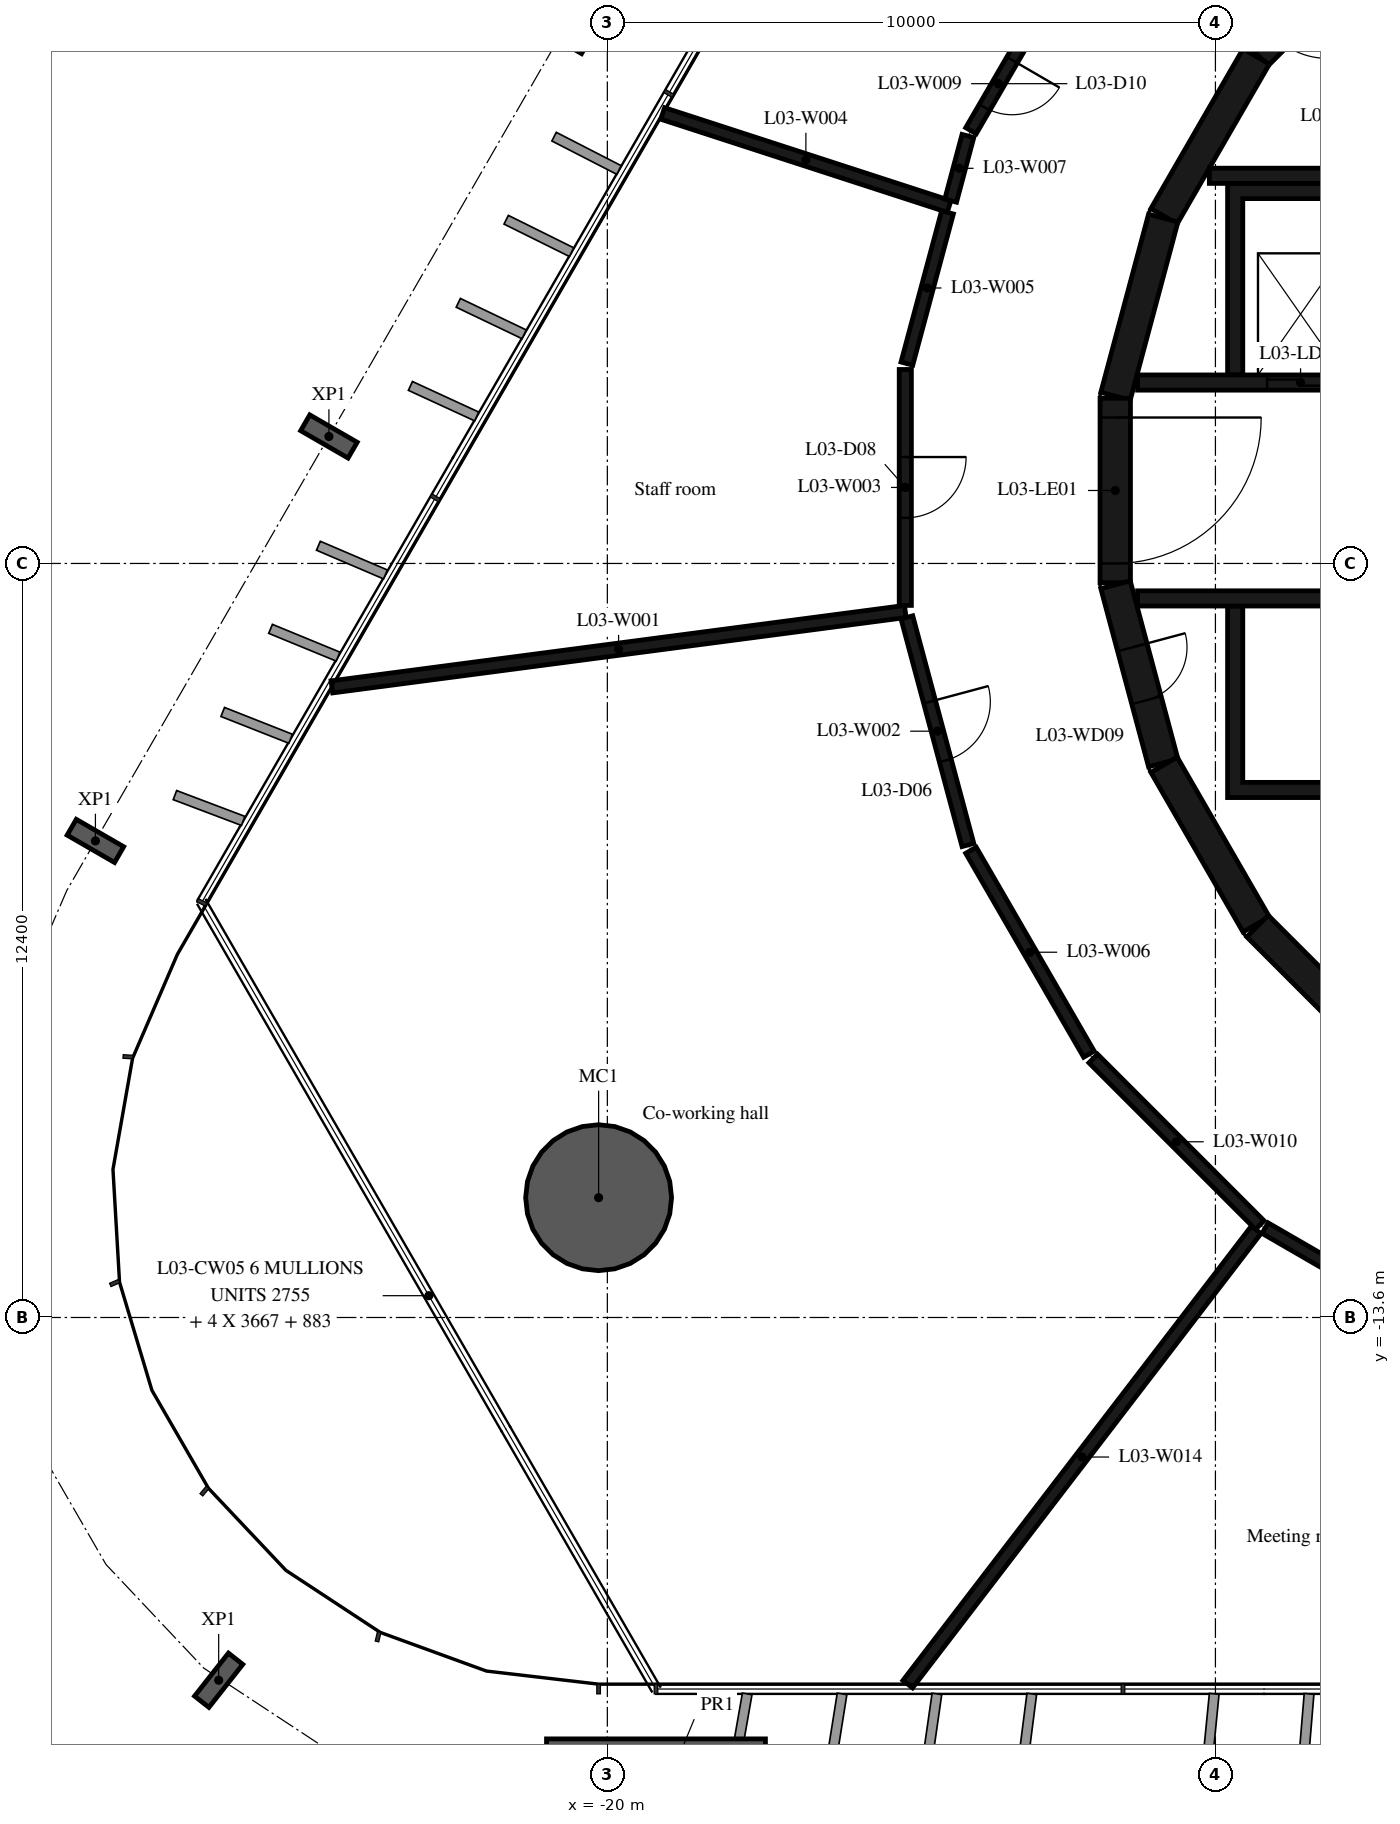
"""IFC4 building model, lengths in metres.
Left out: names, types, materials, properties, quantities, classifications, styles, units other than length and angle.
Written with IfcOpenShell. Run it as: python <this file> out.ifc"""

import sys

from ifc_helpers import new_model, si_unit, direction, frame, frame_2d, origin, origin_2d, place, context, subcontext, project, spatial, polyline, rectangle, hollow_circle, i_section, outline, extrude, element, fill, save


model = new_model("IFC4")
c1 = context("Model", 3, precision=1e-05, world=origin(), true_north=direction((0.0, 1.0)))
c2 = subcontext(c1, "Body", "Model", "MODEL_VIEW")
j1 = project(units=[si_unit("LENGTHUNIT", "METRE"), si_unit("PLANEANGLEUNIT", "RADIAN")], contexts=[c1])
p1 = place(None, origin())
s1 = spatial("IfcSite", under=j1, at=p1, CompositionType="ELEMENT")
p2 = place(p1, origin())
s2 = spatial("IfcBuilding", under=s1, at=p2, CompositionType="ELEMENT")
p3 = place(p2, frame((0.0, 0.0, 18.6)))
s3 = spatial("IfcBuildingStorey", under=s2, at=p3, CompositionType="ELEMENT", Elevation=18.6)
p4 = place(p3, frame((-20.144, -11.63, -0.38), z_axis=(0.0, 0.0, 1.0), x_axis=(1.0, 0.0, 0.0)))
e1 = element("IfcColumn", 1, at=p4, inside=s3, PredefinedType="COLUMN", context=c2, shape_type="SweptSolid", body=[
    extrude(hollow_circle(Radius=1.2, WallThickness=0.06, at=origin_2d()), origin(), (0.0, 0.0, 1.0), 4.8),
])
for number, where, z_axis, x_axis in (
    (2, (-20.739, 7.539, -0.38), (0.0, 0.0, 1.0), (0.5, 0.866, 0.0)),
    (3, (-24.579, 0.888, -0.38), (0.0, 0.0, 1.0), (0.5, 0.866, 0.0)),
    (4, (-28.419, -5.763, -0.38), (0.0, 0.0, 1.0), (0.5, 0.866, 0.0)),
    (5, (-26.392, -19.565, -0.38), (0.0, 0.0, 1.0), (-0.786, 0.619, 0.0)),
):
    element("IfcColumn", number, at=place(p3, frame(where, z_axis=z_axis, x_axis=x_axis)), inside=s3, PredefinedType="COLUMN", context=c2, shape_type="SweptSolid", body=[
        extrude(i_section(OverallWidth=0.3, OverallDepth=0.9, WebThickness=0.019, FlangeThickness=0.035, FilletRadius=0.03, at=origin_2d()), origin(), (0.0, 0.0, 1.0), 4.8),
    ])
p5 = place(p3, frame((-19.2, -21.73, -0.38), z_axis=(0.0, 0.0, 1.0), x_axis=(1.0, 0.0, 0.0)))
e6 = element("IfcColumn", 6, at=p5, inside=s3, PredefinedType="COLUMN", context=c2, shape_type="SweptSolid", body=[
    extrude(rectangle(XDim=3.6, YDim=2.4, at=origin_2d()), origin(), (0.0, 0.0, 1.0), 4.8),
])
p6 = place(p3, frame((-7.164, 9.308, 0.0), z_axis=(0.0, 0.0, 1.0), x_axis=(-0.707106781187, -0.707106781187, 0.0)))
e7 = element("IfcWall", 7, at=p6, inside=s3, PredefinedType="SHEAR", context=c2, shape_type="SweptSolid", body=[
    extrude(rectangle(XDim=3.032, YDim=0.5, at=frame_2d((1.516, 0.0))), origin(), (0.0, 0.0, 1.0), 4.42),
])
p7 = place(p6, frame((1.416, 0.0, 0.0)))
e8 = element("IfcOpeningElement", 8, at=p7, cuts=e7, PredefinedType="OPENING", context=c2, shape_type="SweptSolid", body=[
    extrude(rectangle(XDim=1.2, YDim=2.1, at=frame_2d((0.6, 1.05))), frame((0.0, 0.26, 0.0), z_axis=(0.0, -1.0, 0.0), x_axis=(1.0, 0.0, 0.0)), (0.0, 0.0, 1.0), 0.52),
])
for number, where, z_axis, x_axis in (
    (9, (-9.329, 7.137, 0.0), (0.0, 0.0, 1.0), (-0.5, -0.866, 0.0)),
    (10, (-10.858, 4.479, 0.0), (0.0, 0.0, 1.0), (-0.259, -0.966, 0.0)),
):
    element("IfcWall", number, at=place(p3, frame(where, z_axis=z_axis, x_axis=x_axis)), inside=s3, PredefinedType="SHEAR", context=c2, shape_type="SweptSolid", body=[
        extrude(rectangle(XDim=3.033, YDim=0.5, at=frame_2d((1.516, 0.0))), origin(), (0.0, 0.0, 1.0), 4.42),
    ])
p8 = place(p3, frame((-11.647, 1.516, 0.0), z_axis=(0.0, 0.0, 1.0), x_axis=(0.0, -1.0, 0.0)))
e11 = element("IfcWall", 11, at=p8, inside=s3, PredefinedType="SHEAR", context=c2, shape_type="SweptSolid", body=[
    extrude(rectangle(XDim=3.033, YDim=0.5, at=frame_2d((1.516, 0.0))), origin(), (0.0, 0.0, 1.0), 4.42),
])
p9 = place(p8, frame((0.316, 0.0, 0.0)))
e12 = element("IfcOpeningElement", 12, at=p9, cuts=e11, PredefinedType="OPENING", context=c2, shape_type="SweptSolid", body=[
    extrude(rectangle(XDim=2.4, YDim=2.1, at=frame_2d((1.2, 1.05))), frame((0.0, 0.26, 0.0), z_axis=(0.0, -1.0, 0.0), x_axis=(1.0, 0.0, 0.0)), (0.0, 0.0, 1.0), 0.52),
])
p10 = place(p3, frame((-11.643, -1.55, 0.0), z_axis=(0.0, 0.0, 1.0), x_axis=(0.258734743916, -0.965948410781, 0.0)))
e13 = element("IfcWall", 13, at=p10, inside=s3, PredefinedType="SHEAR", context=c2, shape_type="SweptSolid", body=[
    extrude(rectangle(XDim=3.033, YDim=0.5, at=frame_2d((1.516, 0.0))), origin(), (0.0, 0.0, 1.0), 4.42),
])
p11 = place(p10, frame((1.066, 0.0, 0.0)))
e14 = element("IfcOpeningElement", 14, at=p11, cuts=e13, PredefinedType="OPENING", context=c2, shape_type="SweptSolid", body=[
    extrude(rectangle(XDim=0.9, YDim=2.1, at=frame_2d((0.45, 1.05))), frame((0.0, 0.26, 0.0), z_axis=(0.0, -1.0, 0.0), x_axis=(1.0, 0.0, 0.0)), (0.0, 0.0, 1.0), 0.52),
])
p12 = place(p3, frame((-10.845, -4.51, 0.0), z_axis=(0.0, 0.0, 1.0), x_axis=(0.500087131594, -0.865975092491, 0.0)))
e15 = element("IfcWall", 15, at=p12, inside=s3, PredefinedType="SHEAR", context=c2, shape_type="SweptSolid", body=[
    extrude(rectangle(XDim=3.033, YDim=0.5, at=frame_2d((1.516, 0.0))), origin(), (0.0, 0.0, 1.0), 4.42),
])
p13 = place(p3, frame((-9.308, -7.164, 0.0), z_axis=(0.0, 0.0, 1.0), x_axis=(0.707106781187, -0.707106781187, 0.0)))
e16 = element("IfcWall", 16, at=p13, inside=s3, PredefinedType="SHEAR", context=c2, shape_type="SweptSolid", body=[
    extrude(rectangle(XDim=3.032, YDim=0.5, at=frame_2d((1.516, 0.0))), origin(), (0.0, 0.0, 1.0), 4.42),
])
p14 = place(p3, frame((-7.0, 5.175, 0.0), z_axis=(0.0, 0.0, 1.0), x_axis=(-1.0, 0.0, 0.0)))
e17 = element("IfcWall", 17, at=p14, inside=s3, PredefinedType="SHEAR", context=c2, shape_type="SweptSolid", body=[
    extrude(rectangle(XDim=3.1, YDim=0.25, at=frame_2d((1.55, 0.0))), origin(), (0.0, 0.0, 1.0), 4.42),
])
p15 = place(p3, origin())
e18 = element("IfcWall", 18, at=p15, inside=s3, PredefinedType="SHEAR", context=c2, shape_type="SweptSolid", body=[
    extrude(outline(polyline([(-9.55, 4.8), (-7.65, 4.8), (-7.65, 1.9), (-7.4, 1.9), (-7.4, 4.8), (-5.5, 4.8), (-5.5, 1.9), (-5.25, 1.9), (-5.25, 4.8), (-3.35, 4.8), (-3.35, 1.9), (-3.1, 1.9), (-3.1, 4.8), (-1.2, 4.8), (-1.2, 1.9), (-0.95, 1.9), (-0.95, 4.8), (0.95, 4.8), (0.95, 1.9), (1.2, 1.9), (1.2, 4.8), (3.1, 4.8), (3.1, 1.9), (3.35, 1.9), (3.35, 4.8), (5.25, 4.8), (5.25, 1.9), (5.5, 1.9), (5.5, 4.8), (7.4, 4.8), (7.4, 1.9), (7.65, 1.9), (7.65, 4.8), (9.55, 4.8), (9.55, 1.9), (9.8, 1.9), (9.8, 4.8), (9.8, 5.05), (-9.8, 5.05), (-9.8, 4.8), (-9.8, 1.9), (-9.55, 1.9), (-9.55, 4.8)])), origin(), (0.0, 0.0, 1.0), 4.42),
])
p16 = place(p3, origin())
e19 = element("IfcWall", 19, at=p16, inside=s3, PredefinedType="SHEAR", context=c2, shape_type="SweptSolid", body=[
    extrude(outline(polyline([(9.8, -5.05), (9.8, -4.8), (9.8, -1.9), (9.55, -1.9), (9.55, -4.8), (7.65, -4.8), (7.65, -1.9), (7.4, -1.9), (7.4, -4.8), (5.5, -4.8), (5.5, -1.9), (5.25, -1.9), (5.25, -4.8), (3.35, -4.8), (3.35, -1.9), (3.1, -1.9), (3.1, -4.8), (-5.25, -4.8), (-5.25, -1.9), (-5.5, -1.9), (-5.5, -4.8), (-7.4, -4.8), (-7.4, -1.9), (-7.65, -1.9), (-7.65, -4.8), (-9.55, -4.8), (-9.55, -1.9), (-9.8, -1.9), (-9.8, -4.8), (-9.8, -5.05), (9.8, -5.05)])), origin(), (0.0, 0.0, 1.0), 4.42),
])
p17 = place(p3, frame((-11.28, 1.775, 0.0), z_axis=(0.0, 0.0, 1.0), x_axis=(1.0, 0.0, 0.0)))
e20 = element("IfcWall", 20, at=p17, inside=s3, PredefinedType="SHEAR", context=c2, shape_type="SweptSolid", body=[
    extrude(rectangle(XDim=14.38, YDim=0.25, at=frame_2d((7.19, 0.0))), origin(), (0.0, 0.0, 1.0), 4.42),
])
p18 = place(p17, frame((2.13, 0.0, 0.0)))
e21 = element("IfcOpeningElement", 21, at=p18, cuts=e20, PredefinedType="OPENING", context=c2, shape_type="SweptSolid", body=[
    extrude(rectangle(XDim=1.1, YDim=2.1, at=frame_2d((0.55, 1.05))), frame((0.0, 0.135, 0.0), z_axis=(0.0, -1.0, 0.0), x_axis=(1.0, 0.0, 0.0)), (0.0, 0.0, 1.0), 0.27),
])
p19 = place(p17, frame((4.28, 0.0, 0.0)))
e22 = element("IfcOpeningElement", 22, at=p19, cuts=e20, PredefinedType="OPENING", context=c2, shape_type="SweptSolid", body=[
    extrude(rectangle(XDim=1.1, YDim=2.1, at=frame_2d((0.55, 1.05))), frame((0.0, 0.135, 0.0), z_axis=(0.0, -1.0, 0.0), x_axis=(1.0, 0.0, 0.0)), (0.0, 0.0, 1.0), 0.27),
])
p20 = place(p17, frame((6.43, 0.0, 0.0)))
e23 = element("IfcOpeningElement", 23, at=p20, cuts=e20, PredefinedType="OPENING", context=c2, shape_type="SweptSolid", body=[
    extrude(rectangle(XDim=1.1, YDim=2.1, at=frame_2d((0.55, 1.05))), frame((0.0, 0.135, 0.0), z_axis=(0.0, -1.0, 0.0), x_axis=(1.0, 0.0, 0.0)), (0.0, 0.0, 1.0), 0.27),
])
p21 = place(p17, frame((8.58, 0.0, 0.0)))
e24 = element("IfcOpeningElement", 24, at=p21, cuts=e20, PredefinedType="OPENING", context=c2, shape_type="SweptSolid", body=[
    extrude(rectangle(XDim=1.1, YDim=2.1, at=frame_2d((0.55, 1.05))), frame((0.0, 0.135, 0.0), z_axis=(0.0, -1.0, 0.0), x_axis=(1.0, 0.0, 0.0)), (0.0, 0.0, 1.0), 0.27),
])
p22 = place(p17, frame((10.83, 0.0, 0.0)))
e25 = element("IfcOpeningElement", 25, at=p22, cuts=e20, PredefinedType="OPENING", context=c2, shape_type="SweptSolid", body=[
    extrude(rectangle(XDim=0.9, YDim=2.1, at=frame_2d((0.45, 1.05))), frame((0.0, 0.135, 0.0), z_axis=(0.0, -1.0, 0.0), x_axis=(1.0, 0.0, 0.0)), (0.0, 0.0, 1.0), 0.27),
])
p23 = place(p17, frame((12.98, 0.0, 0.0)))
e26 = element("IfcOpeningElement", 26, at=p23, cuts=e20, PredefinedType="OPENING", context=c2, shape_type="SweptSolid", body=[
    extrude(rectangle(XDim=0.9, YDim=2.1, at=frame_2d((0.45, 1.05))), frame((0.0, 0.135, 0.0), z_axis=(0.0, -1.0, 0.0), x_axis=(1.0, 0.0, 0.0)), (0.0, 0.0, 1.0), 0.27),
])
p24 = place(p3, frame((-11.28, -1.775, 0.0), z_axis=(0.0, 0.0, 1.0), x_axis=(1.0, 0.0, 0.0)))
e27 = element("IfcWall", 27, at=p24, inside=s3, PredefinedType="SHEAR", context=c2, shape_type="SweptSolid", body=[
    extrude(rectangle(XDim=14.38, YDim=0.25, at=frame_2d((7.19, 0.0))), origin(), (0.0, 0.0, 1.0), 4.42),
])
p25 = place(p24, frame((9.755, 0.0, 0.0)))
e28 = element("IfcOpeningElement", 28, at=p25, cuts=e27, PredefinedType="OPENING", context=c2, shape_type="SweptSolid", body=[
    extrude(rectangle(XDim=0.9, YDim=2.1, at=frame_2d((0.45, 1.05))), frame((0.0, 0.135, 0.0), z_axis=(0.0, -1.0, 0.0), x_axis=(1.0, 0.0, 0.0)), (0.0, 0.0, 1.0), 0.27),
])
p26 = place(p3, frame((-15.1, -1.99, 0.0), z_axis=(0.0, 0.0, 1.0), x_axis=(-0.99146503856, -0.130372839634, 0.0)))
e29 = element("IfcWall", 29, at=p26, inside=s3, PredefinedType="PARTITIONING", context=c2, shape_type="SweptSolid", body=[
    extrude(rectangle(XDim=9.511, YDim=0.2, at=frame_2d((4.756, 0.0))), origin(), (0.0, 0.0, 1.0), 4.42),
])
p27 = place(p3, frame((-15.074, -2.087, 0.0), z_axis=(0.0, 0.0, 1.0), x_axis=(0.259026804199, -0.965870133458, 0.0)))
e30 = element("IfcWall", 30, at=p27, inside=s3, PredefinedType="PARTITIONING", context=c2, shape_type="SweptSolid", body=[
    extrude(rectangle(XDim=3.876, YDim=0.2, at=frame_2d((1.938, 0.0))), origin(), (0.0, 0.0, 1.0), 4.42),
])
p28 = place(p27, frame((1.438, 0.0, 0.0)))
e31 = element("IfcOpeningElement", 31, at=p28, cuts=e30, PredefinedType="OPENING", context=c2, shape_type="SweptSolid", body=[
    extrude(rectangle(XDim=1.0, YDim=2.1, at=frame_2d((0.5, 1.05))), frame((0.0, 0.11, 0.0), z_axis=(0.0, -1.0, 0.0), x_axis=(1.0, 0.0, 0.0)), (0.0, 0.0, 1.0), 0.22),
])
p29 = place(p3, frame((-15.1, 1.99, 0.0), z_axis=(0.0, 0.0, 1.0), x_axis=(0.0, -1.0, 0.0)))
e32 = element("IfcWall", 32, at=p29, inside=s3, PredefinedType="PARTITIONING", context=c2, shape_type="SweptSolid", body=[
    extrude(rectangle(XDim=3.88, YDim=0.2, at=frame_2d((1.94, 0.0))), origin(), (0.0, 0.0, 1.0), 4.42),
])
p30 = place(p29, frame((1.44, 0.0, 0.0)))
e33 = element("IfcOpeningElement", 33, at=p30, cuts=e32, PredefinedType="OPENING", context=c2, shape_type="SweptSolid", body=[
    extrude(rectangle(XDim=1.0, YDim=2.1, at=frame_2d((0.5, 1.05))), frame((0.0, 0.11, 0.0), z_axis=(0.0, -1.0, 0.0), x_axis=(1.0, 0.0, 0.0)), (0.0, 0.0, 1.0), 0.22),
])
p31 = place(p3, frame((-14.38, 4.67, 0.0), z_axis=(0.0, 0.0, 1.0), x_axis=(-0.951080790776, 0.308942275219, 0.0)))
e34 = element("IfcWall", 34, at=p31, inside=s3, PredefinedType="PARTITIONING", context=c2, shape_type="SweptSolid", body=[
    extrude(rectangle(XDim=4.952, YDim=0.2, at=frame_2d((2.476, 0.0))), origin(), (0.0, 0.0, 1.0), 4.03),
])
p32 = place(p3, frame((-14.406, 4.573, 0.0), z_axis=(0.0, 0.0, 1.0), x_axis=(-0.259408996071, -0.965767556277, 0.0)))
e35 = element("IfcWall", 35, at=p32, inside=s3, PredefinedType="PARTITIONING", context=c2, shape_type="SweptSolid", body=[
    extrude(rectangle(XDim=2.575, YDim=0.2, at=frame_2d((1.288, 0.0))), origin(), (0.0, 0.0, 1.0), 4.42),
])
p33 = place(p3, frame((-14.02, -5.917, 0.0), z_axis=(0.0, 0.0, 1.0), x_axis=(0.500733182901, -0.865601686425, 0.0)))
e36 = element("IfcWall", 36, at=p33, inside=s3, PredefinedType="PARTITIONING", context=c2, shape_type="SweptSolid", body=[
    extrude(rectangle(XDim=3.874, YDim=0.2, at=frame_2d((1.937, 0.0))), origin(), (0.0, 0.0, 1.0), 4.42),
])
p34 = place(p3, frame((-14.07, 5.83, 0.0), z_axis=(0.0, 0.0, 1.0), x_axis=(-0.258159565639, -0.966102292032, 0.0)))
e37 = element("IfcWall", 37, at=p34, inside=s3, PredefinedType="PARTITIONING", context=c2, shape_type="SweptSolid", body=[
    extrude(rectangle(XDim=1.101, YDim=0.2, at=frame_2d((0.55, 0.0))), origin(), (0.0, 0.0, 1.0), 4.42),
])
p35 = place(p3, frame((-13.12, 7.464, 0.0), z_axis=(0.0, 0.0, 1.0), x_axis=(-0.502589631847, -0.864525107767, 0.0)))
e38 = element("IfcWall", 38, at=p35, inside=s3, PredefinedType="PARTITIONING", context=c2, shape_type="SweptSolid", body=[
    extrude(rectangle(XDim=1.79, YDim=0.2, at=frame_2d((0.895, 0.0))), origin(), (0.0, 0.0, 1.0), 4.42),
])
p36 = place(p35, frame((0.445, 0.0, 0.0)))
e39 = element("IfcOpeningElement", 39, at=p36, cuts=e38, PredefinedType="OPENING", context=c2, shape_type="SweptSolid", body=[
    extrude(rectangle(XDim=0.9, YDim=2.1, at=frame_2d((0.45, 1.05))), frame((0.0, 0.11, 0.0), z_axis=(0.0, -1.0, 0.0), x_axis=(1.0, 0.0, 0.0)), (0.0, 0.0, 1.0), 0.22),
])
p37 = place(p3, frame((-12.009, -9.341, 0.0), z_axis=(0.0, 0.0, 1.0), x_axis=(0.707106781187, -0.707106781187, 0.0)))
e40 = element("IfcWall", 40, at=p37, inside=s3, PredefinedType="PARTITIONING", context=c2, shape_type="SweptSolid", body=[
    extrude(rectangle(XDim=3.874, YDim=0.2, at=frame_2d((1.937, 0.0))), origin(), (0.0, 0.0, 1.0), 4.42),
])
p38 = place(p3, frame((-9.331, -12.159, 0.0), z_axis=(0.0, 0.0, 1.0), x_axis=(-0.608558385637, -0.793509099677, 0.0)))
e41 = element("IfcWall", 41, at=p38, inside=s3, PredefinedType="PARTITIONING", context=c2, shape_type="SweptSolid", body=[
    extrude(rectangle(XDim=9.415, YDim=0.2, at=frame_2d((4.707, 0.0))), origin(), (0.0, 0.0, 1.0), 4.42),
])
p39 = place(p3, frame((-9.183, -12.13, 0.0), z_axis=(0.0, 0.0, 1.0), x_axis=(0.865585884642, -0.500760497952, 0.0)))
e42 = element("IfcWall", 42, at=p39, inside=s3, PredefinedType="PARTITIONING", context=c2, shape_type="SweptSolid", body=[
    extrude(rectangle(XDim=3.874, YDim=0.2, at=frame_2d((1.937, 0.0))), origin(), (0.0, 0.0, 1.0), 4.42),
])
p40 = place(p39, frame((1.437, 0.0, 0.0)))
e43 = element("IfcOpeningElement", 43, at=p40, cuts=e42, PredefinedType="OPENING", context=c2, shape_type="SweptSolid", body=[
    extrude(rectangle(XDim=1.0, YDim=2.1, at=frame_2d((0.5, 1.05))), frame((0.0, 0.11, 0.0), z_axis=(0.0, -1.0, 0.0), x_axis=(1.0, 0.0, 0.0)), (0.0, 0.0, 1.0), 0.22),
])
p41 = place(p9, origin())
e44 = element("IfcDoor", 44, at=p41, inside=s3, OperationType="DOUBLE_DOOR_SINGLE_SWING", PredefinedType="DOOR", context=c2, shape_type="SweptSolid", body=[
    extrude(rectangle(XDim=2.4, YDim=2.1, at=frame_2d((1.2, 1.05))), frame((0.0, 0.025, 0.0), z_axis=(0.0, -1.0, 0.0), x_axis=(1.0, 0.0, 0.0)), (0.0, 0.0, 1.0), 0.05),
])
fill(e12, e44)
p42 = place(p18, origin())
e45 = element("IfcDoor", 45, at=p42, inside=s3, OperationType="DOUBLE_DOOR_SLIDING", PredefinedType="DOOR", context=c2, shape_type="SweptSolid", body=[
    extrude(rectangle(XDim=1.1, YDim=2.1, at=frame_2d((0.55, 1.05))), frame((0.0, 0.025, 0.0), z_axis=(0.0, -1.0, 0.0), x_axis=(1.0, 0.0, 0.0)), (0.0, 0.0, 1.0), 0.05),
])
fill(e21, e45)
p43 = place(p11, origin())
e46 = element("IfcDoor", 46, at=p43, inside=s3, OperationType="SINGLE_SWING_RIGHT", PredefinedType="DOOR", context=c2, shape_type="SweptSolid", body=[
    extrude(rectangle(XDim=0.9, YDim=2.1, at=frame_2d((0.45, 1.05))), frame((0.0, 0.025, 0.0), z_axis=(0.0, -1.0, 0.0), x_axis=(1.0, 0.0, 0.0)), (0.0, 0.0, 1.0), 0.05),
])
fill(e14, e46)
p44 = place(p28, origin())
e47 = element("IfcDoor", 47, at=p44, inside=s3, OperationType="SINGLE_SWING_LEFT", PredefinedType="DOOR", context=c2, shape_type="SweptSolid", body=[
    extrude(rectangle(XDim=1.0, YDim=2.1, at=frame_2d((0.5, 1.05))), frame((0.0, 0.025, 0.0), z_axis=(0.0, -1.0, 0.0), x_axis=(1.0, 0.0, 0.0)), (0.0, 0.0, 1.0), 0.05),
])
fill(e31, e47)
p45 = place(p30, origin())
e48 = element("IfcDoor", 48, at=p45, inside=s3, OperationType="SINGLE_SWING_LEFT", PredefinedType="DOOR", context=c2, shape_type="SweptSolid", body=[
    extrude(rectangle(XDim=1.0, YDim=2.1, at=frame_2d((0.5, 1.05))), frame((0.0, 0.025, 0.0), z_axis=(0.0, -1.0, 0.0), x_axis=(1.0, 0.0, 0.0)), (0.0, 0.0, 1.0), 0.05),
])
fill(e33, e48)
p46 = place(p36, origin())
e49 = element("IfcDoor", 49, at=p46, inside=s3, OperationType="SINGLE_SWING_LEFT", PredefinedType="DOOR", context=c2, shape_type="SweptSolid", body=[
    extrude(rectangle(XDim=0.9, YDim=2.1, at=frame_2d((0.45, 1.05))), frame((0.0, 0.025, 0.0), z_axis=(0.0, -1.0, 0.0), x_axis=(1.0, 0.0, 0.0)), (0.0, 0.0, 1.0), 0.05),
])
fill(e39, e49)
save(model, sys.argv[1])
